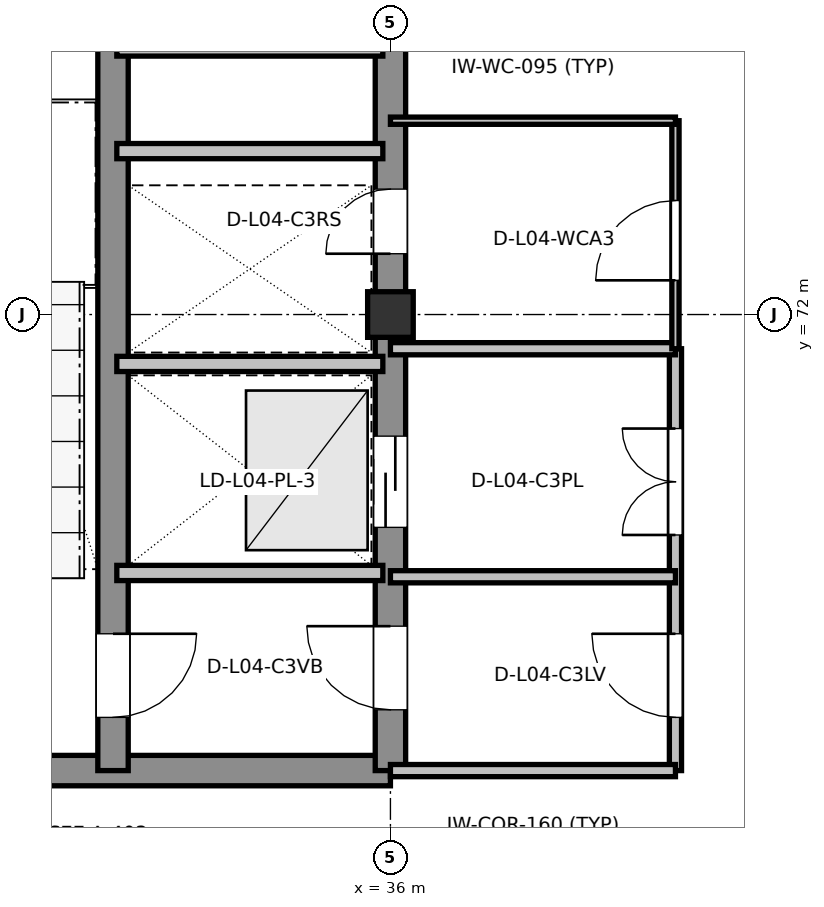
"""IFC4 building model, lengths in metres.
Left out: names, types, materials, properties, quantities, classifications, styles, units other than length and angle.
Written with IfcOpenShell. Run it as: python <this file> out.ifc"""

import sys

from ifc_helpers import new_model, si_unit, direction, frame, frame_2d, origin, origin_2d, place, context, subcontext, project, spatial, rectangle, extrude, element, fill, save


model = new_model("IFC4")
c1 = context("Model", 3, precision=1e-05, world=origin(), true_north=direction((0.0, 1.0)))
c2 = subcontext(c1, "Body", "Model", "MODEL_VIEW")
j1 = project(units=[si_unit("LENGTHUNIT", "METRE"), si_unit("PLANEANGLEUNIT", "RADIAN")], contexts=[c1])
p1 = place(None, origin())
s1 = spatial("IfcSite", under=j1, at=p1, CompositionType="ELEMENT")
p2 = place(p1, origin())
s2 = spatial("IfcBuilding", under=s1, at=p2, CompositionType="ELEMENT")
p3 = place(p2, frame((0.0, 0.0, 19.2)))
s3 = spatial("IfcBuildingStorey", under=s2, at=p3, CompositionType="ELEMENT", Elevation=19.2)
p4 = place(p3, frame((36.0, 72.0, 0.0), z_axis=(0.0, 0.0, 1.0), x_axis=(1.0, 0.0, 0.0)))
e1 = element("IfcColumn", 1, at=p4, inside=s3, PredefinedType="COLUMN", context=c2, shape_type="SweptSolid", body=[
    extrude(rectangle(XDim=0.6, YDim=0.6, at=origin_2d()), origin(), (0.0, 0.0, 1.0), 4.2),
])
p5 = place(p3, frame((27.0, 66.0, 0.0), z_axis=(0.0, 0.0, 1.0), x_axis=(1.0, 0.0, 0.0)))
e2 = element("IfcWall", 2, at=p5, inside=s3, PredefinedType="SHEAR", context=c2, shape_type="SweptSolid", body=[
    extrude(rectangle(XDim=9.0, YDim=0.4, at=frame_2d((4.5, 0.0))), origin(), (0.0, 0.0, 1.0), 3.96),
])
p6 = place(p3, frame((36.0, 66.0, 0.0), z_axis=(0.0, 0.0, 1.0), x_axis=(0.0, 1.0, 0.0)))
e3 = element("IfcWall", 3, at=p6, inside=s3, PredefinedType="SHEAR", context=c2, shape_type="SweptSolid", body=[
    extrude(rectangle(XDim=18.0, YDim=0.4, at=frame_2d((9.0, 0.0))), origin(), (0.0, 0.0, 1.0), 3.96),
])
p7 = place(p6, frame((0.8, 0.0, 0.0)))
e4 = element("IfcOpeningElement", 4, at=p7, cuts=e3, PredefinedType="OPENING", context=c2, shape_type="SweptSolid", body=[
    extrude(rectangle(XDim=1.1, YDim=2.16, at=frame_2d((0.55, 1.08))), frame((0.0, 0.21, 0.0), z_axis=(0.0, -1.0, 0.0), x_axis=(1.0, 0.0, 0.0)), (0.0, 0.0, 1.0), 0.42),
])
p8 = place(p6, frame((3.2, 0.0, 0.0)))
e5 = element("IfcOpeningElement", 5, at=p8, cuts=e3, PredefinedType="OPENING", context=c2, shape_type="SweptSolid", body=[
    extrude(rectangle(XDim=1.2, YDim=2.2, at=frame_2d((0.6, 1.1))), frame((0.0, 0.21, 0.0), z_axis=(0.0, -1.0, 0.0), x_axis=(1.0, 0.0, 0.0)), (0.0, 0.0, 1.0), 0.42),
])
p9 = place(p6, frame((6.8, 0.0, 0.0)))
e6 = element("IfcOpeningElement", 6, at=p9, cuts=e3, PredefinedType="OPENING", context=c2, shape_type="SweptSolid", body=[
    extrude(rectangle(XDim=0.85, YDim=2.1, at=frame_2d((0.425, 1.05))), frame((0.0, 0.21, 0.0), z_axis=(0.0, -1.0, 0.0), x_axis=(1.0, 0.0, 0.0)), (0.0, 0.0, 1.0), 0.42),
])
p10 = place(p3, frame((32.35, 66.0, 0.0), z_axis=(0.0, 0.0, 1.0), x_axis=(0.0, 1.0, 0.0)))
e7 = element("IfcWall", 7, at=p10, inside=s3, PredefinedType="SHEAR", context=c2, shape_type="SweptSolid", body=[
    extrude(rectangle(XDim=18.0, YDim=0.4, at=frame_2d((9.0, 0.0))), origin(), (0.0, 0.0, 1.0), 3.96),
])
p11 = place(p10, frame((0.7, 0.0, 0.0)))
e8 = element("IfcOpeningElement", 8, at=p11, cuts=e7, PredefinedType="OPENING", context=c2, shape_type="SweptSolid", body=[
    extrude(rectangle(XDim=1.1, YDim=2.16, at=frame_2d((0.55, 1.08))), frame((0.0, 0.21, 0.0), z_axis=(0.0, -1.0, 0.0), x_axis=(1.0, 0.0, 0.0)), (0.0, 0.0, 1.0), 0.42),
])
for number, where, z_axis, x_axis in (
    (9, (32.4, 68.6, 0.0), (0.0, 0.0, 1.0), (1.0, 0.0, 0.0)),
    (10, (32.4, 71.35, 0.0), (0.0, 0.0, 1.0), (1.0, 0.0, 0.0)),
    (11, (32.4, 74.15, 0.0), (0.0, 0.0, 1.0), (1.0, 0.0, 0.0)),
    (12, (32.4, 75.5, 0.0), (0.0, 0.0, 1.0), (1.0, 0.0, 0.0)),
):
    element("IfcWall", number, at=place(p3, frame(where, z_axis=z_axis, x_axis=x_axis)), inside=s3, PredefinedType="PARTITIONING", context=c2, shape_type="SweptSolid", body=[
        extrude(rectangle(XDim=3.5, YDim=0.2, at=frame_2d((1.75, 0.0))), origin(), (0.0, 0.0, 1.0), 3.96),
    ])
p12 = place(p3, frame((39.75, 66.0, 0.0), z_axis=(0.0, 0.0, 1.0), x_axis=(0.0, 1.0, 0.0)))
e13 = element("IfcWall", 13, at=p12, inside=s3, PredefinedType="PARTITIONING", context=c2, shape_type="SweptSolid", body=[
    extrude(rectangle(XDim=5.55, YDim=0.16, at=frame_2d((2.775, 0.0))), origin(), (0.0, 0.0, 1.0), 3.96),
])
p13 = place(p12, frame((0.7, 0.0, 0.0)))
e14 = element("IfcOpeningElement", 14, at=p13, cuts=e13, PredefinedType="OPENING", context=c2, shape_type="SweptSolid", body=[
    extrude(rectangle(XDim=1.1, YDim=2.16, at=frame_2d((0.55, 1.08))), frame((0.0, 0.09, 0.0), z_axis=(0.0, -1.0, 0.0), x_axis=(1.0, 0.0, 0.0)), (0.0, 0.0, 1.0), 0.18),
])
p14 = place(p12, frame((3.1, 0.0, 0.0)))
e15 = element("IfcOpeningElement", 15, at=p14, cuts=e13, PredefinedType="OPENING", context=c2, shape_type="SweptSolid", body=[
    extrude(rectangle(XDim=1.4, YDim=2.2, at=frame_2d((0.7, 1.1))), frame((0.0, 0.09, 0.0), z_axis=(0.0, -1.0, 0.0), x_axis=(1.0, 0.0, 0.0)), (0.0, 0.0, 1.0), 0.18),
])
p15 = place(p3, frame((36.0, 66.0, 0.0), z_axis=(0.0, 0.0, 1.0), x_axis=(1.0, 0.0, 0.0)))
e16 = element("IfcWall", 16, at=p15, inside=s3, PredefinedType="PARTITIONING", context=c2, shape_type="SweptSolid", body=[
    extrude(rectangle(XDim=3.75, YDim=0.16, at=frame_2d((1.875, 0.0))), origin(), (0.0, 0.0, 1.0), 3.675),
])
for number, where, z_axis, x_axis in (
    (17, (36.0, 68.55, 0.0), (0.0, 0.0, 1.0), (1.0, 0.0, 0.0)),
    (18, (36.0, 71.55, 0.0), (0.0, 0.0, 1.0), (1.0, 0.0, 0.0)),
):
    element("IfcWall", number, at=place(p3, frame(where, z_axis=z_axis, x_axis=x_axis)), inside=s3, PredefinedType="PARTITIONING", context=c2, shape_type="SweptSolid", body=[
        extrude(rectangle(XDim=3.75, YDim=0.16, at=frame_2d((1.875, 0.0))), origin(), (0.0, 0.0, 1.0), 3.96),
    ])
p16 = place(p3, frame((39.75, 71.55, 0.0), z_axis=(0.0, 0.0, 1.0), x_axis=(0.0, 1.0, 0.0)))
e19 = element("IfcWall", 19, at=p16, inside=s3, PredefinedType="PARTITIONING", context=c2, shape_type="SweptSolid", body=[
    extrude(rectangle(XDim=3.0, YDim=0.095, at=frame_2d((1.5, 0.0))), origin(), (0.0, 0.0, 1.0), 3.96),
])
p17 = place(p16, frame((0.9, 0.0, 0.0)))
e20 = element("IfcOpeningElement", 20, at=p17, cuts=e19, PredefinedType="OPENING", context=c2, shape_type="SweptSolid", body=[
    extrude(rectangle(XDim=1.05, YDim=2.13, at=frame_2d((0.525, 1.065))), frame((0.0, 0.057, 0.0), z_axis=(0.0, -1.0, 0.0), x_axis=(1.0, 0.0, 0.0)), (0.0, 0.0, 1.0), 0.115),
])
p18 = place(p3, frame((36.0, 74.55, 0.0), z_axis=(0.0, 0.0, 1.0), x_axis=(1.0, 0.0, 0.0)))
e21 = element("IfcWall", 21, at=p18, inside=s3, PredefinedType="PARTITIONING", context=c2, shape_type="SweptSolid", body=[
    extrude(rectangle(XDim=3.75, YDim=0.095, at=frame_2d((1.875, 0.0))), origin(), (0.0, 0.0, 1.0), 3.96),
])
p19 = place(p11, frame((1.1, 0.0, 0.0), z_axis=(0.0, 0.0, 1.0), x_axis=(-1.0, 0.0, 0.0)))
e22 = element("IfcDoor", 22, at=p19, inside=s3, OperationType="SINGLE_SWING_LEFT", PredefinedType="DOOR", context=c2, shape_type="SweptSolid", body=[
    extrude(rectangle(XDim=1.1, YDim=2.16, at=frame_2d((0.55, 1.08))), frame((0.0, 0.025, 0.0), z_axis=(0.0, -1.0, 0.0), x_axis=(1.0, 0.0, 0.0)), (0.0, 0.0, 1.0), 0.05),
])
fill(e8, e22)
p20 = place(p7, origin())
e23 = element("IfcDoor", 23, at=p20, inside=s3, OperationType="SINGLE_SWING_RIGHT", PredefinedType="DOOR", context=c2, shape_type="SweptSolid", body=[
    extrude(rectangle(XDim=1.1, YDim=2.16, at=frame_2d((0.55, 1.08))), frame((0.0, 0.025, 0.0), z_axis=(0.0, -1.0, 0.0), x_axis=(1.0, 0.0, 0.0)), (0.0, 0.0, 1.0), 0.05),
])
fill(e4, e23)
p21 = place(p8, origin())
e24 = element("IfcDoor", 24, at=p21, inside=s3, OperationType="SLIDING_TO_LEFT", PredefinedType="DOOR", context=c2, shape_type="SweptSolid", body=[
    extrude(rectangle(XDim=1.2, YDim=2.2, at=frame_2d((0.6, 1.1))), frame((0.0, 0.025, 0.0), z_axis=(0.0, -1.0, 0.0), x_axis=(1.0, 0.0, 0.0)), (0.0, 0.0, 1.0), 0.05),
])
fill(e5, e24)
p22 = place(p9, origin())
e25 = element("IfcDoor", 25, at=p22, inside=s3, OperationType="SINGLE_SWING_LEFT", PredefinedType="DOOR", context=c2, shape_type="SweptSolid", body=[
    extrude(rectangle(XDim=0.85, YDim=2.1, at=frame_2d((0.425, 1.05))), frame((0.0, 0.025, 0.0), z_axis=(0.0, -1.0, 0.0), x_axis=(1.0, 0.0, 0.0)), (0.0, 0.0, 1.0), 0.05),
])
fill(e6, e25)
p23 = place(p13, origin())
e26 = element("IfcDoor", 26, at=p23, inside=s3, OperationType="SINGLE_SWING_RIGHT", PredefinedType="DOOR", context=c2, shape_type="SweptSolid", body=[
    extrude(rectangle(XDim=1.1, YDim=2.16, at=frame_2d((0.55, 1.08))), frame((0.0, 0.025, 0.0), z_axis=(0.0, -1.0, 0.0), x_axis=(1.0, 0.0, 0.0)), (0.0, 0.0, 1.0), 0.05),
])
fill(e14, e26)
p24 = place(p14, origin())
e27 = element("IfcDoor", 27, at=p24, inside=s3, OperationType="DOUBLE_DOOR_SINGLE_SWING", PredefinedType="DOOR", context=c2, shape_type="SweptSolid", body=[
    extrude(rectangle(XDim=1.4, YDim=2.2, at=frame_2d((0.7, 1.1))), frame((0.0, 0.025, 0.0), z_axis=(0.0, -1.0, 0.0), x_axis=(1.0, 0.0, 0.0)), (0.0, 0.0, 1.0), 0.05),
])
fill(e15, e27)
p25 = place(p17, origin())
e28 = element("IfcDoor", 28, at=p25, inside=s3, OperationType="SINGLE_SWING_LEFT", PredefinedType="DOOR", context=c2, shape_type="SweptSolid", body=[
    extrude(rectangle(XDim=1.05, YDim=2.13, at=frame_2d((0.525, 1.065))), frame((0.0, 0.025, 0.0), z_axis=(0.0, -1.0, 0.0), x_axis=(1.0, 0.0, 0.0)), (0.0, 0.0, 1.0), 0.05),
])
fill(e20, e28)
save(model, sys.argv[1])
